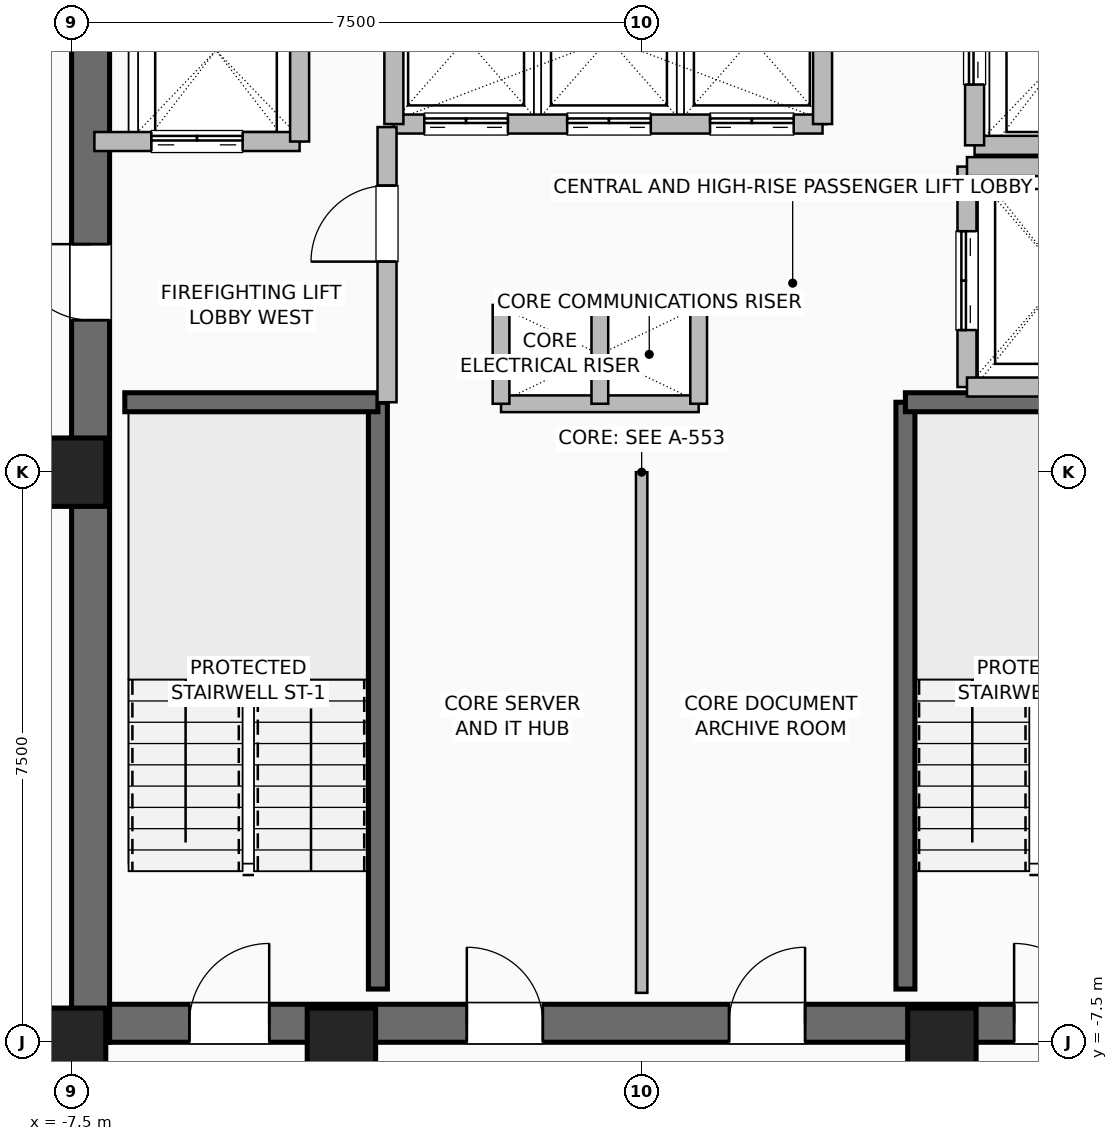
"""IFC4 building model, lengths in metres.
Left out: names, types, materials, properties, quantities, classifications, styles, units other than length and angle.
Written with IfcOpenShell. Run it as: python <this file> out.ifc"""

import sys

from ifc_helpers import new_model, si_unit, direction, frame, frame_2d, origin, origin_2d, place, context, subcontext, project, spatial, rectangle, hollow_rectangle, extrude, element, fill, save


model = new_model("IFC4")
c1 = context("Model", 3, precision=1e-05, world=origin(), true_north=direction((0.0, 1.0)))
c2 = subcontext(c1, "Body", "Model", "MODEL_VIEW")
j1 = project(units=[si_unit("LENGTHUNIT", "METRE"), si_unit("PLANEANGLEUNIT", "RADIAN")], contexts=[c1])
p1 = place(None, origin())
s1 = spatial("IfcSite", under=j1, at=p1, CompositionType="ELEMENT")
p2 = place(p1, origin())
s2 = spatial("IfcBuilding", under=s1, at=p2, CompositionType="ELEMENT")
p3 = place(p2, frame((0.0, 0.0, 209.4)))
s3 = spatial("IfcBuildingStorey", under=s2, at=p3, CompositionType="ELEMENT", Elevation=209.4)
for number, where, z_axis, x_axis in (
    (1, (-7.5, -7.5, 0.0), (0.0, 0.0, 1.0), (1.0, 0.0, 0.0)),
    (2, (-3.95, -7.5, 0.0), (0.0, 0.0, 1.0), (1.0, 0.0, 0.0)),
    (3, (3.95, -7.5, 0.0), (0.0, 0.0, 1.0), (1.0, 0.0, 0.0)),
    (4, (-7.5, 0.0, 0.0), (0.0, 0.0, 1.0), (1.0, 0.0, 0.0)),
):
    element("IfcColumn", number, at=place(p3, frame(where, z_axis=z_axis, x_axis=x_axis)), inside=s3, PredefinedType="COLUMN", context=c2, shape_type="SweptSolid", body=[
        extrude(hollow_rectangle(XDim=0.9, YDim=0.9, WallThickness=0.045, at=origin_2d()), origin(), (0.0, 0.0, 1.0), 3.6),
    ])
p4 = place(p3, frame((-7.5, -7.25, 0.0), z_axis=(0.0, 0.0, 1.0), x_axis=(1.0, 0.0, 0.0)))
e5 = element("IfcWall", 5, at=p4, inside=s3, PredefinedType="SHEAR", context=c2, shape_type="SweptSolid", body=[
    extrude(rectangle(XDim=15.0, YDim=0.5, at=frame_2d((7.5, 0.0))), origin(), (0.0, 0.0, 1.0), 3.36),
])
p5 = place(p4, frame((1.55, 0.0, 0.0)))
e6 = element("IfcOpeningElement", 6, at=p5, cuts=e5, PredefinedType="OPENING", context=c2, shape_type="SweptSolid", body=[
    extrude(rectangle(XDim=1.05, YDim=2.08, at=frame_2d((0.525, 1.04))), frame((0.0, 0.26, 0.0), z_axis=(0.0, -1.0, 0.0), x_axis=(1.0, 0.0, 0.0)), (0.0, 0.0, 1.0), 0.52),
])
p6 = place(p4, frame((12.4, 0.0, 0.0)))
e7 = element("IfcOpeningElement", 7, at=p6, cuts=e5, PredefinedType="OPENING", context=c2, shape_type="SweptSolid", body=[
    extrude(rectangle(XDim=1.05, YDim=2.08, at=frame_2d((0.525, 1.04))), frame((0.0, 0.26, 0.0), z_axis=(0.0, -1.0, 0.0), x_axis=(1.0, 0.0, 0.0)), (0.0, 0.0, 1.0), 0.52),
])
p7 = place(p4, frame((5.2, 0.0, 0.0)))
e8 = element("IfcOpeningElement", 8, at=p7, cuts=e5, PredefinedType="OPENING", context=c2, shape_type="SweptSolid", body=[
    extrude(rectangle(XDim=1.0, YDim=2.08, at=frame_2d((0.5, 1.04))), frame((0.0, 0.26, 0.0), z_axis=(0.0, -1.0, 0.0), x_axis=(1.0, 0.0, 0.0)), (0.0, 0.0, 1.0), 0.52),
])
p8 = place(p4, frame((8.65, 0.0, 0.0)))
e9 = element("IfcOpeningElement", 9, at=p8, cuts=e5, PredefinedType="OPENING", context=c2, shape_type="SweptSolid", body=[
    extrude(rectangle(XDim=1.0, YDim=2.08, at=frame_2d((0.5, 1.04))), frame((0.0, 0.26, 0.0), z_axis=(0.0, -1.0, 0.0), x_axis=(1.0, 0.0, 0.0)), (0.0, 0.0, 1.0), 0.52),
])
p9 = place(p3, frame((-7.25, -7.5, 0.0), z_axis=(0.0, 0.0, 1.0), x_axis=(0.0, 1.0, 0.0)))
e10 = element("IfcWall", 10, at=p9, inside=s3, PredefinedType="SHEAR", context=c2, shape_type="SweptSolid", body=[
    extrude(rectangle(XDim=15.0, YDim=0.5, at=frame_2d((7.5, 0.0))), origin(), (0.0, 0.0, 1.0), 3.36),
])
p10 = place(p9, frame((9.5, 0.0, 0.0)))
e11 = element("IfcOpeningElement", 11, at=p10, cuts=e10, PredefinedType="OPENING", context=c2, shape_type="SweptSolid", body=[
    extrude(rectangle(XDim=1.0, YDim=2.08, at=frame_2d((0.5, 1.04))), frame((0.0, 0.26, 0.0), z_axis=(0.0, -1.0, 0.0), x_axis=(1.0, 0.0, 0.0)), (0.0, 0.0, 1.0), 0.52),
])
p11 = place(p3, frame((-3.47, -6.8, 0.0), z_axis=(0.0, 0.0, 1.0), x_axis=(0.0, 1.0, 0.0)))
e12 = element("IfcWall", 12, at=p11, inside=s3, PredefinedType="SHEAR", context=c2, shape_type="SweptSolid", body=[
    extrude(rectangle(XDim=7.72, YDim=0.25, at=frame_2d((3.86, 0.0))), origin(), (0.0, 0.0, 1.0), 3.36),
])
p12 = place(p3, frame((-6.8, 0.92, 0.0), z_axis=(0.0, 0.0, 1.0), x_axis=(1.0, 0.0, 0.0)))
e13 = element("IfcWall", 13, at=p12, inside=s3, PredefinedType="SHEAR", context=c2, shape_type="SweptSolid", body=[
    extrude(rectangle(XDim=3.33, YDim=0.25, at=frame_2d((1.665, 0.0))), origin(), (0.0, 0.0, 1.0), 3.36),
])
p13 = place(p3, frame((3.47, -6.8, 0.0), z_axis=(0.0, 0.0, 1.0), x_axis=(0.0, 1.0, 0.0)))
e14 = element("IfcWall", 14, at=p13, inside=s3, PredefinedType="SHEAR", context=c2, shape_type="SweptSolid", body=[
    extrude(rectangle(XDim=7.72, YDim=0.25, at=frame_2d((3.86, 0.0))), origin(), (0.0, 0.0, 1.0), 3.36),
])
p14 = place(p3, frame((3.47, 0.92, 0.0), z_axis=(0.0, 0.0, 1.0), x_axis=(1.0, 0.0, 0.0)))
e15 = element("IfcWall", 15, at=p14, inside=s3, PredefinedType="SHEAR", context=c2, shape_type="SweptSolid", body=[
    extrude(rectangle(XDim=3.33, YDim=0.25, at=frame_2d((1.665, 0.0))), origin(), (0.0, 0.0, 1.0), 3.36),
])
for number, where, z_axis, x_axis in (
    (16, (-1.85, 2.2, 0.0), (0.0, 0.0, 1.0), (1.0, 0.0, 0.0)),
    (17, (-1.85, 0.9, 0.0), (0.0, 0.0, 1.0), (1.0, 0.0, 0.0)),
):
    element("IfcWall", number, at=place(p3, frame(where, z_axis=z_axis, x_axis=x_axis)), inside=s3, PredefinedType="PARTITIONING", context=c2, shape_type="SweptSolid", body=[
        extrude(rectangle(XDim=2.6, YDim=0.22, at=frame_2d((1.3, 0.0))), origin(), (0.0, 0.0, 1.0), 3.36),
    ])
for number, where, z_axis, x_axis in (
    (18, (-0.55, 0.9, 0.0), (0.0, 0.0, 1.0), (0.0, 1.0, 0.0)),
    (19, (0.75, 0.9, 0.0), (0.0, 0.0, 1.0), (0.0, 1.0, 0.0)),
    (20, (-1.85, 0.9, 0.0), (0.0, 0.0, 1.0), (0.0, 1.0, 0.0)),
):
    element("IfcWall", number, at=place(p3, frame(where, z_axis=z_axis, x_axis=x_axis)), inside=s3, PredefinedType="PARTITIONING", context=c2, shape_type="SweptSolid", body=[
        extrude(rectangle(XDim=1.3, YDim=0.22, at=frame_2d((0.65, 0.0))), origin(), (0.0, 0.0, 1.0), 3.36),
    ])
p15 = place(p3, frame((-3.26, 4.58, 0.0), z_axis=(0.0, 0.0, 1.0), x_axis=(1.0, 0.0, 0.0)))
e21 = element("IfcWall", 21, at=p15, inside=s3, PredefinedType="SHEAR", context=c2, shape_type="SweptSolid", body=[
    extrude(rectangle(XDim=5.64, YDim=0.25, at=frame_2d((2.82, 0.0))), origin(), (0.0, 0.0, 1.0), 3.36),
])
p16 = place(p15, frame((0.4, 0.0, 0.0)))
e22 = element("IfcOpeningElement", 22, at=p16, cuts=e21, PredefinedType="OPENING", context=c2, shape_type="SweptSolid", body=[
    extrude(rectangle(XDim=1.1, YDim=2.2, at=frame_2d((0.55, 1.1))), frame((0.0, 0.135, 0.0), z_axis=(0.0, -1.0, 0.0), x_axis=(1.0, 0.0, 0.0)), (0.0, 0.0, 1.0), 0.27),
])
p17 = place(p15, frame((2.28, 0.0, 0.0)))
e23 = element("IfcOpeningElement", 23, at=p17, cuts=e21, PredefinedType="OPENING", context=c2, shape_type="SweptSolid", body=[
    extrude(rectangle(XDim=1.1, YDim=2.2, at=frame_2d((0.55, 1.1))), frame((0.0, 0.135, 0.0), z_axis=(0.0, -1.0, 0.0), x_axis=(1.0, 0.0, 0.0)), (0.0, 0.0, 1.0), 0.27),
])
p18 = place(p15, frame((4.16, 0.0, 0.0)))
e24 = element("IfcOpeningElement", 24, at=p18, cuts=e21, PredefinedType="OPENING", context=c2, shape_type="SweptSolid", body=[
    extrude(rectangle(XDim=1.1, YDim=2.2, at=frame_2d((0.55, 1.1))), frame((0.0, 0.135, 0.0), z_axis=(0.0, -1.0, 0.0), x_axis=(1.0, 0.0, 0.0)), (0.0, 0.0, 1.0), 0.27),
])
for number, where, z_axis, x_axis in (
    (25, (-3.26, 4.58, 0.0), (0.0, 0.0, 1.0), (0.0, 1.0, 0.0)),
    (26, (2.38, 4.58, 0.0), (0.0, 0.0, 1.0), (0.0, 1.0, 0.0)),
):
    element("IfcWall", number, at=place(p3, frame(where, z_axis=z_axis, x_axis=x_axis)), inside=s3, PredefinedType="SHEAR", context=c2, shape_type="SweptSolid", body=[
        extrude(rectangle(XDim=2.22, YDim=0.25, at=frame_2d((1.11, 0.0))), origin(), (0.0, 0.0, 1.0), 3.36),
    ])
p19 = place(p3, frame((-7.2, 4.35, 0.0), z_axis=(0.0, 0.0, 1.0), x_axis=(1.0, 0.0, 0.0)))
e27 = element("IfcWall", 27, at=p19, inside=s3, PredefinedType="SHEAR", context=c2, shape_type="SweptSolid", body=[
    extrude(rectangle(XDim=2.7, YDim=0.25, at=frame_2d((1.35, 0.0))), origin(), (0.0, 0.0, 1.0), 3.36),
])
p20 = place(p19, frame((0.75, 0.0, 0.0)))
e28 = element("IfcOpeningElement", 28, at=p20, cuts=e27, PredefinedType="OPENING", context=c2, shape_type="SweptSolid", body=[
    extrude(rectangle(XDim=1.2, YDim=2.2, at=frame_2d((0.6, 1.1))), frame((0.0, 0.135, 0.0), z_axis=(0.0, -1.0, 0.0), x_axis=(1.0, 0.0, 0.0)), (0.0, 0.0, 1.0), 0.27),
])
p21 = place(p3, frame((-4.5, 4.35, 0.0), z_axis=(0.0, 0.0, 1.0), x_axis=(0.0, 1.0, 0.0)))
e29 = element("IfcWall", 29, at=p21, inside=s3, PredefinedType="SHEAR", context=c2, shape_type="SweptSolid", body=[
    extrude(rectangle(XDim=2.85, YDim=0.25, at=frame_2d((1.425, 0.0))), origin(), (0.0, 0.0, 1.0), 3.36),
])
p22 = place(p3, frame((4.38, 4.3, 0.0), z_axis=(0.0, 0.0, 1.0), x_axis=(1.0, 0.0, 0.0)))
e30 = element("IfcWall", 30, at=p22, inside=s3, PredefinedType="SHEAR", context=c2, shape_type="SweptSolid", body=[
    extrude(rectangle(XDim=2.42, YDim=0.25, at=frame_2d((1.21, 0.0))), origin(), (0.0, 0.0, 1.0), 3.36),
])
p23 = place(p3, frame((4.38, 4.3, 0.0), z_axis=(0.0, 0.0, 1.0), x_axis=(0.0, 1.0, 0.0)))
e31 = element("IfcWall", 31, at=p23, inside=s3, PredefinedType="SHEAR", context=c2, shape_type="SweptSolid", body=[
    extrude(rectangle(XDim=2.5, YDim=0.25, at=frame_2d((1.25, 0.0))), origin(), (0.0, 0.0, 1.0), 3.36),
])
p24 = place(p23, frame((0.8, 0.0, 0.0)))
e32 = element("IfcOpeningElement", 32, at=p24, cuts=e31, PredefinedType="OPENING", context=c2, shape_type="SweptSolid", body=[
    extrude(rectangle(XDim=1.2, YDim=2.2, at=frame_2d((0.6, 1.1))), frame((0.0, 0.135, 0.0), z_axis=(0.0, -1.0, 0.0), x_axis=(1.0, 0.0, 0.0)), (0.0, 0.0, 1.0), 0.27),
])
p25 = place(p3, frame((4.28, 1.12, 0.0), z_axis=(0.0, 0.0, 1.0), x_axis=(0.0, 1.0, 0.0)))
e33 = element("IfcWall", 33, at=p25, inside=s3, PredefinedType="SHEAR", context=c2, shape_type="SweptSolid", body=[
    extrude(rectangle(XDim=2.9, YDim=0.25, at=frame_2d((1.45, 0.0))), origin(), (0.0, 0.0, 1.0), 3.36),
])
p26 = place(p25, frame((0.75, 0.0, 0.0)))
e34 = element("IfcOpeningElement", 34, at=p26, cuts=e33, PredefinedType="OPENING", context=c2, shape_type="SweptSolid", body=[
    extrude(rectangle(XDim=1.3, YDim=2.3, at=frame_2d((0.65, 1.15))), frame((0.0, 0.135, 0.0), z_axis=(0.0, -1.0, 0.0), x_axis=(1.0, 0.0, 0.0)), (0.0, 0.0, 1.0), 0.27),
])
for number, where, z_axis, x_axis in (
    (35, (4.28, 1.12, 0.0), (0.0, 0.0, 1.0), (1.0, 0.0, 0.0)),
    (36, (4.28, 4.02, 0.0), (0.0, 0.0, 1.0), (1.0, 0.0, 0.0)),
):
    element("IfcWall", number, at=place(p3, frame(where, z_axis=z_axis, x_axis=x_axis)), inside=s3, PredefinedType="SHEAR", context=c2, shape_type="SweptSolid", body=[
        extrude(rectangle(XDim=2.52, YDim=0.25, at=frame_2d((1.26, 0.0))), origin(), (0.0, 0.0, 1.0), 3.36),
    ])
p27 = place(p3, frame((-3.35, 0.92, 0.0), z_axis=(0.0, 0.0, 1.0), x_axis=(0.0, 1.0, 0.0)))
e37 = element("IfcWall", 37, at=p27, inside=s3, PredefinedType="SHEAR", context=c2, shape_type="SweptSolid", body=[
    extrude(rectangle(XDim=3.62, YDim=0.25, at=frame_2d((1.81, 0.0))), origin(), (0.0, 0.0, 1.0), 3.36),
])
p28 = place(p27, frame((1.85, 0.0, 0.0)))
e38 = element("IfcOpeningElement", 38, at=p28, cuts=e37, PredefinedType="OPENING", context=c2, shape_type="SweptSolid", body=[
    extrude(rectangle(XDim=1.0, YDim=2.08, at=frame_2d((0.5, 1.04))), frame((0.0, 0.135, 0.0), z_axis=(0.0, -1.0, 0.0), x_axis=(1.0, 0.0, 0.0)), (0.0, 0.0, 1.0), 0.27),
])
p29 = place(p3, frame((0.0, -6.85, 0.0), z_axis=(0.0, 0.0, 1.0), x_axis=(0.0, 1.0, 0.0)))
e39 = element("IfcWall", 39, at=p29, inside=s3, PredefinedType="PARTITIONING", context=c2, shape_type="SweptSolid", body=[
    extrude(rectangle(XDim=6.85, YDim=0.15, at=frame_2d((3.425, 0.0))), origin(), (0.0, 0.0, 1.0), 3.36),
])
p30 = place(p5, origin())
e40 = element("IfcDoor", 40, at=p30, inside=s3, OperationType="SINGLE_SWING_RIGHT", PredefinedType="DOOR", context=c2, shape_type="SweptSolid", body=[
    extrude(rectangle(XDim=1.05, YDim=2.08, at=frame_2d((0.525, 1.04))), frame((0.0, 0.025, 0.0), z_axis=(0.0, -1.0, 0.0), x_axis=(1.0, 0.0, 0.0)), (0.0, 0.0, 1.0), 0.05),
])
fill(e6, e40)
p31 = place(p6, origin())
e41 = element("IfcDoor", 41, at=p31, inside=s3, OperationType="SINGLE_SWING_LEFT", PredefinedType="DOOR", context=c2, shape_type="SweptSolid", body=[
    extrude(rectangle(XDim=1.05, YDim=2.08, at=frame_2d((0.525, 1.04))), frame((0.0, 0.025, 0.0), z_axis=(0.0, -1.0, 0.0), x_axis=(1.0, 0.0, 0.0)), (0.0, 0.0, 1.0), 0.05),
])
fill(e7, e41)
p32 = place(p10, origin())
e42 = element("IfcDoor", 42, at=p32, inside=s3, OperationType="SINGLE_SWING_RIGHT", PredefinedType="DOOR", context=c2, shape_type="SweptSolid", body=[
    extrude(rectangle(XDim=1.0, YDim=2.08, at=frame_2d((0.5, 1.04))), frame((0.0, 0.025, 0.0), z_axis=(0.0, -1.0, 0.0), x_axis=(1.0, 0.0, 0.0)), (0.0, 0.0, 1.0), 0.05),
])
fill(e11, e42)
p33 = place(p7, origin())
e43 = element("IfcDoor", 43, at=p33, inside=s3, OperationType="SINGLE_SWING_LEFT", PredefinedType="DOOR", context=c2, shape_type="SweptSolid", body=[
    extrude(rectangle(XDim=1.0, YDim=2.08, at=frame_2d((0.5, 1.04))), frame((0.0, 0.025, 0.0), z_axis=(0.0, -1.0, 0.0), x_axis=(1.0, 0.0, 0.0)), (0.0, 0.0, 1.0), 0.05),
])
fill(e8, e43)
p34 = place(p8, origin())
e44 = element("IfcDoor", 44, at=p34, inside=s3, OperationType="SINGLE_SWING_RIGHT", PredefinedType="DOOR", context=c2, shape_type="SweptSolid", body=[
    extrude(rectangle(XDim=1.0, YDim=2.08, at=frame_2d((0.5, 1.04))), frame((0.0, 0.025, 0.0), z_axis=(0.0, -1.0, 0.0), x_axis=(1.0, 0.0, 0.0)), (0.0, 0.0, 1.0), 0.05),
])
fill(e9, e44)
p35 = place(p16, origin())
e45 = element("IfcDoor", 45, at=p35, inside=s3, OperationType="DOUBLE_DOOR_SLIDING", PredefinedType="DOOR", context=c2, shape_type="SweptSolid", body=[
    extrude(rectangle(XDim=1.1, YDim=2.2, at=frame_2d((0.55, 1.1))), frame((0.0, 0.025, 0.0), z_axis=(0.0, -1.0, 0.0), x_axis=(1.0, 0.0, 0.0)), (0.0, 0.0, 1.0), 0.05),
])
fill(e22, e45)
p36 = place(p17, origin())
e46 = element("IfcDoor", 46, at=p36, inside=s3, OperationType="DOUBLE_DOOR_SLIDING", PredefinedType="DOOR", context=c2, shape_type="SweptSolid", body=[
    extrude(rectangle(XDim=1.1, YDim=2.2, at=frame_2d((0.55, 1.1))), frame((0.0, 0.025, 0.0), z_axis=(0.0, -1.0, 0.0), x_axis=(1.0, 0.0, 0.0)), (0.0, 0.0, 1.0), 0.05),
])
fill(e23, e46)
p37 = place(p18, origin())
e47 = element("IfcDoor", 47, at=p37, inside=s3, OperationType="DOUBLE_DOOR_SLIDING", PredefinedType="DOOR", context=c2, shape_type="SweptSolid", body=[
    extrude(rectangle(XDim=1.1, YDim=2.2, at=frame_2d((0.55, 1.1))), frame((0.0, 0.025, 0.0), z_axis=(0.0, -1.0, 0.0), x_axis=(1.0, 0.0, 0.0)), (0.0, 0.0, 1.0), 0.05),
])
fill(e24, e47)
p38 = place(p20, origin())
e48 = element("IfcDoor", 48, at=p38, inside=s3, OperationType="DOUBLE_DOOR_SLIDING", PredefinedType="DOOR", context=c2, shape_type="SweptSolid", body=[
    extrude(rectangle(XDim=1.2, YDim=2.2, at=frame_2d((0.6, 1.1))), frame((0.0, 0.025, 0.0), z_axis=(0.0, -1.0, 0.0), x_axis=(1.0, 0.0, 0.0)), (0.0, 0.0, 1.0), 0.05),
])
fill(e28, e48)
p39 = place(p24, origin())
e49 = element("IfcDoor", 49, at=p39, inside=s3, OperationType="DOUBLE_DOOR_SLIDING", PredefinedType="DOOR", context=c2, shape_type="SweptSolid", body=[
    extrude(rectangle(XDim=1.2, YDim=2.2, at=frame_2d((0.6, 1.1))), frame((0.0, 0.025, 0.0), z_axis=(0.0, -1.0, 0.0), x_axis=(1.0, 0.0, 0.0)), (0.0, 0.0, 1.0), 0.05),
])
fill(e32, e49)
p40 = place(p26, origin())
e50 = element("IfcDoor", 50, at=p40, inside=s3, OperationType="DOUBLE_DOOR_SLIDING", PredefinedType="DOOR", context=c2, shape_type="SweptSolid", body=[
    extrude(rectangle(XDim=1.3, YDim=2.3, at=frame_2d((0.65, 1.15))), frame((0.0, 0.025, 0.0), z_axis=(0.0, -1.0, 0.0), x_axis=(1.0, 0.0, 0.0)), (0.0, 0.0, 1.0), 0.05),
])
fill(e34, e50)
p41 = place(p28, origin())
e51 = element("IfcDoor", 51, at=p41, inside=s3, OperationType="SINGLE_SWING_LEFT", PredefinedType="DOOR", context=c2, shape_type="SweptSolid", body=[
    extrude(rectangle(XDim=1.0, YDim=2.08, at=frame_2d((0.5, 1.04))), frame((0.0, 0.025, 0.0), z_axis=(0.0, -1.0, 0.0), x_axis=(1.0, 0.0, 0.0)), (0.0, 0.0, 1.0), 0.05),
])
fill(e38, e51)
save(model, sys.argv[1])
